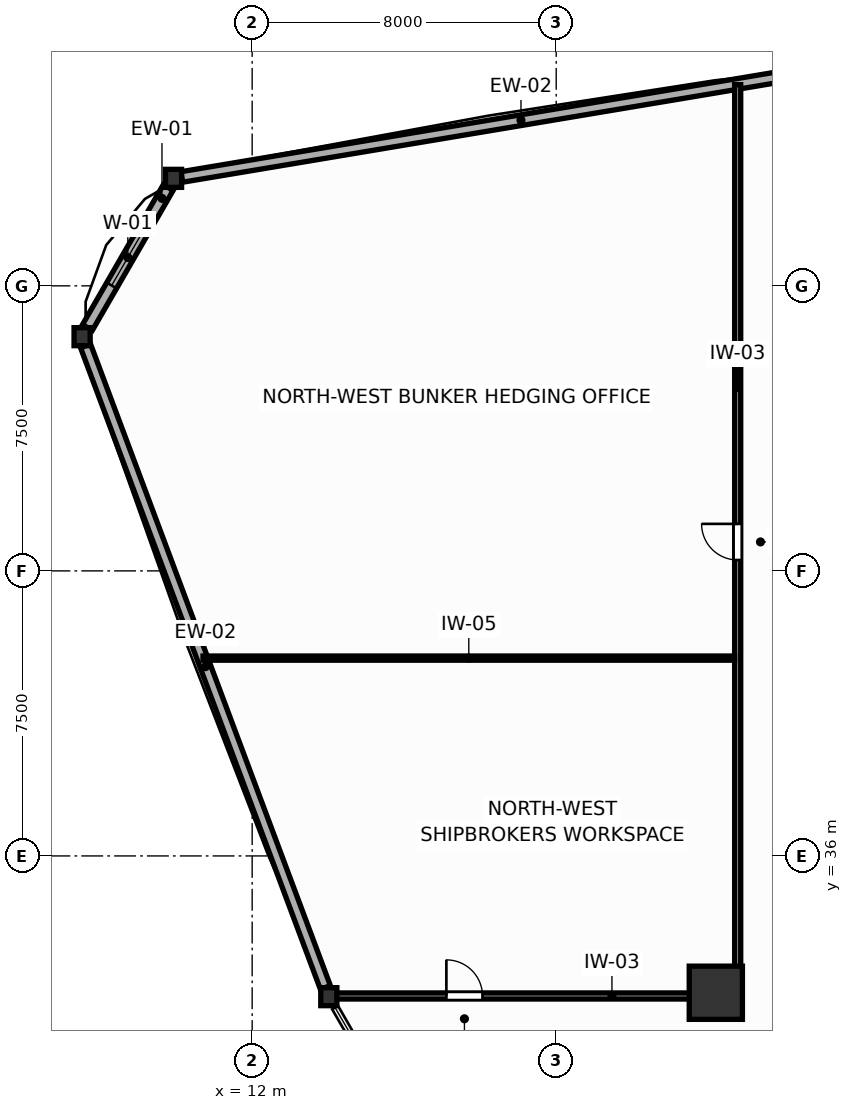
"""IFC4 building model, lengths in metres.
Left out: names, types, materials, properties, quantities, classifications, styles, units other than length and angle.
Written with IfcOpenShell. Run it as: python <this file> out.ifc"""

import sys

from ifc_helpers import new_model, si_unit, direction, frame, frame_2d, origin, origin_2d, place, context, subcontext, project, spatial, rectangle, i_section, extrude, source, transform, mapped, element, fill, save


model = new_model("IFC4")
c1 = context("Model", 3, precision=1e-05, world=origin(), true_north=direction((0.0, 1.0)))
c2 = subcontext(c1, "Body", "Model", "MODEL_VIEW")
j1 = project(units=[si_unit("LENGTHUNIT", "METRE"), si_unit("PLANEANGLEUNIT", "RADIAN")], contexts=[c1])
p1 = place(None, origin())
s1 = spatial("IfcSite", under=j1, at=p1, CompositionType="ELEMENT")
p2 = place(p1, origin())
s2 = spatial("IfcBuilding", under=s1, at=p2, CompositionType="ELEMENT")
p3 = place(p2, frame((0.0, 0.0, 47.4)))
s3 = spatial("IfcBuildingStorey", under=s2, at=p3, CompositionType="ELEMENT", Elevation=47.4)
m1 = source(origin(), c2, "Body", "SweptSolid", [
    extrude(rectangle(XDim=1.4, YDim=1.4, at=origin_2d()), origin(), (0.0, 0.0, 1.0), 3.9),
])
p4 = place(p3, frame((24.2, 32.4, 0.0), z_axis=(0.0, 0.0, 1.0), x_axis=(1.0, 0.0, 0.0)))
e1 = element("IfcColumn", 1, at=p4, inside=s3, PredefinedType="COLUMN", context=c2, shape_type="MappedRepresentation", body=[
    mapped(m1, transform((0.0, 0.0, 0.0), scale=1.0)),
])
m2 = source(origin(), c2, "Body", "SweptSolid", [
    extrude(i_section(OverallWidth=0.424, OverallDepth=0.474, WebThickness=0.045, FlangeThickness=0.072, FilletRadius=0.015, at=origin_2d()), origin(), (0.0, 0.0, 1.0), 3.9),
])
for number, where, z_axis, x_axis in (
    (2, (9.931, 53.829, 0.0), (0.0, 0.0, 1.0), (1.0, 0.0, 0.0)),
    (3, (7.525, 49.662, 0.0), (0.0, 0.0, 1.0), (1.0, 0.0, 0.0)),
    (4, (14.017, 32.297, 0.0), (0.0, 0.0, 1.0), (1.0, 0.0, 0.0)),
):
    element("IfcColumn", number, at=place(p3, frame(where, z_axis=z_axis, x_axis=x_axis)), inside=s3, PredefinedType="COLUMN", context=c2, shape_type="MappedRepresentation", body=[
        mapped(m2, transform((0.0, 0.0, 0.0), scale=1.0)),
    ])
p5 = place(p3, frame((27.998, 56.853, 0.0), z_axis=(0.0, 0.0, 1.0), x_axis=(-0.986273350987, -0.165120795577, 0.0)))
e5 = element("IfcWall", 5, at=p5, inside=s3, PredefinedType="SOLIDWALL", context=c2, shape_type="SweptSolid", body=[
    extrude(rectangle(XDim=18.099, YDim=0.28, at=frame_2d((9.05, 0.0))), origin(), (0.0, 0.0, 1.0), 3.23),
])
p6 = place(p3, frame((9.791, 53.586, 0.0), z_axis=(0.0, 0.0, 1.0), x_axis=(-0.500017365573, -0.866015377534, 0.0)))
e6 = element("IfcWall", 6, at=p6, inside=s3, PredefinedType="SOLIDWALL", context=c2, shape_type="SweptSolid", body=[
    extrude(rectangle(XDim=4.252, YDim=0.3, at=frame_2d((2.126, 0.0))), origin(), (0.0, 0.0, 1.0), 3.23),
])
p7 = place(p6, frame((1.276, 0.0, 0.75)))
e7 = element("IfcOpeningElement", 7, at=p7, cuts=e6, PredefinedType="OPENING", context=c2, shape_type="SweptSolid", body=[
    extrude(rectangle(XDim=1.7, YDim=1.75, at=frame_2d((0.85, 0.875))), frame((0.0, 0.16, 0.0), z_axis=(0.0, -1.0, 0.0), x_axis=(1.0, 0.0, 0.0)), (0.0, 0.0, 1.0), 0.32),
])
p8 = place(p3, frame((7.616, 49.42, 0.0), z_axis=(0.0, 0.0, 1.0), x_axis=(0.350140465982, -0.936697205121, 0.0)))
e8 = element("IfcWall", 8, at=p8, inside=s3, PredefinedType="SOLIDWALL", context=c2, shape_type="SweptSolid", body=[
    extrude(rectangle(XDim=18.022, YDim=0.28, at=frame_2d((9.011, 0.0))), origin(), (0.0, 0.0, 1.0), 3.23),
])
p9 = place(p3, frame((24.775, 32.31, 0.0), z_axis=(0.0, 0.0, 1.0), x_axis=(0.0, 1.0, 0.0)))
e9 = element("IfcWall", 9, at=p9, inside=s3, PredefinedType="PARTITIONING", context=c2, shape_type="SweptSolid", body=[
    extrude(rectangle(XDim=23.984, YDim=0.16, at=frame_2d((11.992, 0.0))), origin(), (0.0, 0.0, 1.0), 3.68),
])
p10 = place(p9, frame((11.477, 0.0, 0.0)))
e10 = element("IfcOpeningElement", 10, at=p10, cuts=e9, PredefinedType="OPENING", context=c2, shape_type="SweptSolid", body=[
    extrude(rectangle(XDim=0.95, YDim=2.05, at=frame_2d((0.475, 1.025))), frame((0.0, 0.09, 0.0), z_axis=(0.0, -1.0, 0.0), x_axis=(1.0, 0.0, 0.0)), (0.0, 0.0, 1.0), 0.18),
])
p11 = place(p3, frame((14.03, 32.315, 0.0), z_axis=(0.0, 0.0, 1.0), x_axis=(1.0, 0.0, 0.0)))
e11 = element("IfcWall", 11, at=p11, inside=s3, PredefinedType="PARTITIONING", context=c2, shape_type="SweptSolid", body=[
    extrude(rectangle(XDim=10.663, YDim=0.16, at=frame_2d((5.332, 0.0))), origin(), (0.0, 0.0, 1.0), 3.18),
])
p12 = place(p11, frame((3.08, 0.0, 0.0)))
e12 = element("IfcOpeningElement", 12, at=p12, cuts=e11, PredefinedType="OPENING", context=c2, shape_type="SweptSolid", body=[
    extrude(rectangle(XDim=0.95, YDim=2.05, at=frame_2d((0.475, 1.025))), frame((0.0, 0.09, 0.0), z_axis=(0.0, -1.0, 0.0), x_axis=(1.0, 0.0, 0.0)), (0.0, 0.0, 1.0), 0.18),
])
p13 = place(p3, frame((10.707, 41.205, 0.0), z_axis=(0.0, 0.0, 1.0), x_axis=(1.0, 0.0, 0.0)))
e13 = element("IfcWall", 13, at=p13, inside=s3, PredefinedType="MOVABLE", context=c2, shape_type="SweptSolid", body=[
    extrude(rectangle(XDim=13.986, YDim=0.11, at=frame_2d((6.993, 0.0))), origin(), (0.0, 0.0, 1.0), 3.68),
])
p14 = place(p7, origin())
e14 = element("IfcWindow", 14, at=p14, inside=s3, PartitioningType="SINGLE_PANEL", PredefinedType="WINDOW", context=c2, shape_type="SweptSolid", body=[
    extrude(rectangle(XDim=1.7, YDim=1.75, at=frame_2d((0.85, 0.875))), frame((0.0, 0.03, 0.0), z_axis=(0.0, -1.0, 0.0), x_axis=(1.0, 0.0, 0.0)), (0.0, 0.0, 1.0), 0.06),
])
fill(e7, e14)
p15 = place(p10, origin())
e15 = element("IfcDoor", 15, at=p15, inside=s3, OperationType="SINGLE_SWING_RIGHT", PredefinedType="DOOR", context=c2, shape_type="SweptSolid", body=[
    extrude(rectangle(XDim=0.95, YDim=2.05, at=frame_2d((0.475, 1.025))), frame((0.0, 0.025, 0.0), z_axis=(0.0, -1.0, 0.0), x_axis=(1.0, 0.0, 0.0)), (0.0, 0.0, 1.0), 0.05),
])
fill(e10, e15)
p16 = place(p12, origin())
e16 = element("IfcDoor", 16, at=p16, inside=s3, OperationType="SINGLE_SWING_LEFT", PredefinedType="DOOR", context=c2, shape_type="SweptSolid", body=[
    extrude(rectangle(XDim=0.95, YDim=2.05, at=frame_2d((0.475, 1.025))), frame((0.0, 0.025, 0.0), z_axis=(0.0, -1.0, 0.0), x_axis=(1.0, 0.0, 0.0)), (0.0, 0.0, 1.0), 0.05),
])
fill(e12, e16)
save(model, sys.argv[1])
